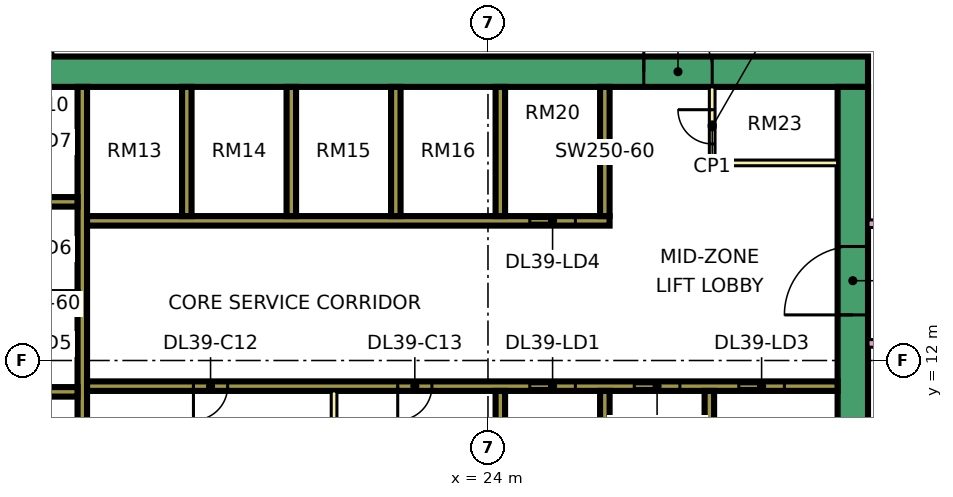
"""IFC4 building model, lengths in metres.
Left out: names, types, materials, properties, quantities, classifications, styles, units other than length and angle.
Written with IfcOpenShell. Run it as: python <this file> out.ifc"""

import sys

from ifc_helpers import new_model, si_unit, direction, frame, frame_2d, origin, place, context, subcontext, project, spatial, rectangle, extrude, element, fill, save


model = new_model("IFC4")
c1 = context("Model", 3, precision=1e-05, world=origin(), true_north=direction((0.0, 1.0)))
c2 = subcontext(c1, "Body", "Model", "MODEL_VIEW")
j1 = project(units=[si_unit("LENGTHUNIT", "METRE"), si_unit("PLANEANGLEUNIT", "RADIAN")], contexts=[c1])
p1 = place(None, origin())
s1 = spatial("IfcSite", under=j1, at=p1, CompositionType="ELEMENT")
p2 = place(p1, origin())
s2 = spatial("IfcBuilding", under=s1, at=p2, CompositionType="ELEMENT")
p3 = place(p2, frame((0.0, 0.0, 172.4)))
s3 = spatial("IfcBuildingStorey", under=s2, at=p3, CompositionType="ELEMENT", Elevation=172.4)
p4 = place(p3, frame((9.0, 19.6, 0.0), z_axis=(0.0, 0.0, 1.0), x_axis=(1.0, 0.0, 0.0)))
e1 = element("IfcWall", 1, at=p4, inside=s3, PredefinedType="SHEAR", context=c2, shape_type="SweptSolid", body=[
    extrude(rectangle(XDim=25.0, YDim=0.8, at=frame_2d((12.5, 0.0))), origin(), (0.0, 0.0, 1.0), 3.75),
])
p5 = place(p4, frame((19.1, 0.0, 0.0)))
e2 = element("IfcOpeningElement", 2, at=p5, cuts=e1, PredefinedType="OPENING", context=c2, shape_type="SweptSolid", body=[
    extrude(rectangle(XDim=1.8, YDim=2.4, at=frame_2d((0.9, 1.2))), frame((0.0, 0.41, 0.0), z_axis=(0.0, -1.0, 0.0), x_axis=(1.0, 0.0, 0.0)), (0.0, 0.0, 1.0), 0.82),
])
p6 = place(p3, frame((33.6, 7.8, 0.0), z_axis=(0.0, 0.0, 1.0), x_axis=(0.0, 1.0, 0.0)))
e3 = element("IfcWall", 3, at=p6, inside=s3, PredefinedType="SHEAR", context=c2, shape_type="SweptSolid", body=[
    extrude(rectangle(XDim=11.4, YDim=0.8, at=frame_2d((5.7, 0.0))), origin(), (0.0, 0.0, 1.0), 3.75),
])
p7 = place(p6, frame((5.4, 0.0, 0.0)))
e4 = element("IfcOpeningElement", 4, at=p7, cuts=e3, PredefinedType="OPENING", context=c2, shape_type="SweptSolid", body=[
    extrude(rectangle(XDim=1.8, YDim=2.4, at=frame_2d((0.9, 1.2))), frame((0.0, 0.41, 0.0), z_axis=(0.0, -1.0, 0.0), x_axis=(1.0, 0.0, 0.0)), (0.0, 0.0, 1.0), 0.82),
])
p8 = place(p3, frame((13.325, 7.8, 0.0), z_axis=(0.0, 0.0, 1.0), x_axis=(0.0, 1.0, 0.0)))
e5 = element("IfcWall", 5, at=p8, inside=s3, PredefinedType="SHEAR", context=c2, shape_type="SweptSolid", body=[
    extrude(rectangle(XDim=11.4, YDim=0.25, at=frame_2d((5.7, 0.0))), origin(), (0.0, 0.0, 1.0), 3.75),
])
p9 = place(p3, frame((13.45, 11.325, 0.0), z_axis=(0.0, 0.0, 1.0), x_axis=(1.0, 0.0, 0.0)))
e6 = element("IfcWall", 6, at=p9, inside=s3, PredefinedType="SHEAR", context=c2, shape_type="SweptSolid", body=[
    extrude(rectangle(XDim=19.75, YDim=0.25, at=frame_2d((9.875, 0.0))), origin(), (0.0, 0.0, 1.0), 3.75),
])
p10 = place(p9, frame((11.65, 0.0, 0.0)))
e7 = element("IfcOpeningElement", 7, at=p10, cuts=e6, PredefinedType="OPENING", context=c2, shape_type="SweptSolid", body=[
    extrude(rectangle(XDim=1.2, YDim=2.2, at=frame_2d((0.6, 1.1))), frame((0.0, 0.135, 0.0), z_axis=(0.0, -1.0, 0.0), x_axis=(1.0, 0.0, 0.0)), (0.0, 0.0, 1.0), 0.27),
])
p11 = place(p9, frame((14.4, 0.0, 0.0)))
e8 = element("IfcOpeningElement", 8, at=p11, cuts=e6, PredefinedType="OPENING", context=c2, shape_type="SweptSolid", body=[
    extrude(rectangle(XDim=1.2, YDim=2.2, at=frame_2d((0.6, 1.1))), frame((0.0, 0.135, 0.0), z_axis=(0.0, -1.0, 0.0), x_axis=(1.0, 0.0, 0.0)), (0.0, 0.0, 1.0), 0.27),
])
p12 = place(p9, frame((17.15, 0.0, 0.0)))
e9 = element("IfcOpeningElement", 9, at=p12, cuts=e6, PredefinedType="OPENING", context=c2, shape_type="SweptSolid", body=[
    extrude(rectangle(XDim=1.2, YDim=2.2, at=frame_2d((0.6, 1.1))), frame((0.0, 0.135, 0.0), z_axis=(0.0, -1.0, 0.0), x_axis=(1.0, 0.0, 0.0)), (0.0, 0.0, 1.0), 0.27),
])
p13 = place(p9, frame((2.8, 0.0, 0.0)))
e10 = element("IfcOpeningElement", 10, at=p13, cuts=e6, PredefinedType="OPENING", context=c2, shape_type="SweptSolid", body=[
    extrude(rectangle(XDim=0.9, YDim=2.1, at=frame_2d((0.45, 1.05))), frame((0.0, 0.135, 0.0), z_axis=(0.0, -1.0, 0.0), x_axis=(1.0, 0.0, 0.0)), (0.0, 0.0, 1.0), 0.27),
])
p14 = place(p9, frame((8.175, 0.0, 0.0)))
e11 = element("IfcOpeningElement", 11, at=p14, cuts=e6, PredefinedType="OPENING", context=c2, shape_type="SweptSolid", body=[
    extrude(rectangle(XDim=0.9, YDim=2.1, at=frame_2d((0.45, 1.05))), frame((0.0, 0.135, 0.0), z_axis=(0.0, -1.0, 0.0), x_axis=(1.0, 0.0, 0.0)), (0.0, 0.0, 1.0), 0.27),
])
p15 = place(p3, frame((13.45, 15.675, 0.0), z_axis=(0.0, 0.0, 1.0), x_axis=(1.0, 0.0, 0.0)))
e12 = element("IfcWall", 12, at=p15, inside=s3, PredefinedType="SHEAR", context=c2, shape_type="SweptSolid", body=[
    extrude(rectangle(XDim=13.75, YDim=0.25, at=frame_2d((6.875, 0.0))), origin(), (0.0, 0.0, 1.0), 3.75),
])
p16 = place(p15, frame((11.65, 0.0, 0.0)))
e13 = element("IfcOpeningElement", 13, at=p16, cuts=e12, PredefinedType="OPENING", context=c2, shape_type="SweptSolid", body=[
    extrude(rectangle(XDim=1.2, YDim=2.2, at=frame_2d((0.6, 1.1))), frame((0.0, 0.135, 0.0), z_axis=(0.0, -1.0, 0.0), x_axis=(1.0, 0.0, 0.0)), (0.0, 0.0, 1.0), 0.27),
])
for number, where, z_axis, x_axis in (
    (14, (10.2, 11.175, 0.0), (0.0, 0.0, 1.0), (1.0, 0.0, 0.0)),
    (15, (10.2, 13.675, 0.0), (0.0, 0.0, 1.0), (1.0, 0.0, 0.0)),
    (16, (10.2, 16.175, 0.0), (0.0, 0.0, 1.0), (1.0, 0.0, 0.0)),
):
    element("IfcWall", number, at=place(p3, frame(where, z_axis=z_axis, x_axis=x_axis)), inside=s3, PredefinedType="SHEAR", context=c2, shape_type="SweptSolid", body=[
        extrude(rectangle(XDim=3.0, YDim=0.25, at=frame_2d((1.5, 0.0))), origin(), (0.0, 0.0, 1.0), 3.75),
    ])
for number, where, z_axis, x_axis in (
    (17, (24.325, 7.8, 0.0), (0.0, 0.0, 1.0), (0.0, 1.0, 0.0)),
    (18, (27.075, 7.8, 0.0), (0.0, 0.0, 1.0), (0.0, 1.0, 0.0)),
    (19, (29.825, 7.8, 0.0), (0.0, 0.0, 1.0), (0.0, 1.0, 0.0)),
    (20, (16.075, 15.8, 0.0), (0.0, 0.0, 1.0), (0.0, 1.0, 0.0)),
    (21, (18.825, 15.8, 0.0), (0.0, 0.0, 1.0), (0.0, 1.0, 0.0)),
    (22, (21.575, 15.8, 0.0), (0.0, 0.0, 1.0), (0.0, 1.0, 0.0)),
    (23, (24.325, 15.8, 0.0), (0.0, 0.0, 1.0), (0.0, 1.0, 0.0)),
    (24, (27.075, 15.8, 0.0), (0.0, 0.0, 1.0), (0.0, 1.0, 0.0)),
):
    element("IfcWall", number, at=place(p3, frame(where, z_axis=z_axis, x_axis=x_axis)), inside=s3, PredefinedType="SHEAR", context=c2, shape_type="SweptSolid", body=[
        extrude(rectangle(XDim=3.4, YDim=0.25, at=frame_2d((1.7, 0.0))), origin(), (0.0, 0.0, 1.0), 3.75),
    ])
p17 = place(p3, frame((-1.447, 12.553, 0.0), z_axis=(0.0, 0.0, 1.0), x_axis=(0.707106781187, -0.707106781187, 0.0)))
e25 = element("IfcWall", 25, at=p17, inside=s3, PredefinedType="SOLIDWALL", context=c2, shape_type="SweptSolid", body=[
    extrude(rectangle(XDim=19.799, YDim=0.15, at=frame_2d((9.899, 0.0))), origin(), (0.0, 0.0, 1.0), 3.35),
])
p18 = place(p17, frame((2.212, 0.0, 0.45)))
e26 = element("IfcOpeningElement", 26, at=p18, cuts=e25, PredefinedType="OPENING", context=c2, shape_type="SweptSolid", body=[
    extrude(rectangle(XDim=3.0, YDim=2.4, at=frame_2d((1.5, 1.2))), frame((0.0, 0.085, 0.0), z_axis=(0.0, -1.0, 0.0), x_axis=(1.0, 0.0, 0.0)), (0.0, 0.0, 1.0), 0.17),
])
p19 = place(p17, frame((10.216, 0.0, 0.45)))
e27 = element("IfcOpeningElement", 27, at=p19, cuts=e25, PredefinedType="OPENING", context=c2, shape_type="SweptSolid", body=[
    extrude(rectangle(XDim=3.0, YDim=2.4, at=frame_2d((1.5, 1.2))), frame((0.0, 0.085, 0.0), z_axis=(0.0, -1.0, 0.0), x_axis=(1.0, 0.0, 0.0)), (0.0, 0.0, 1.0), 0.17),
])
p20 = place(p3, frame((19.95, 7.8, 0.0), z_axis=(0.0, 0.0, 1.0), x_axis=(0.0, 1.0, 0.0)))
e28 = element("IfcWall", 28, at=p20, inside=s3, PredefinedType="PARTITIONING", context=c2, shape_type="SweptSolid", body=[
    extrude(rectangle(XDim=3.4, YDim=0.15, at=frame_2d((1.7, 0.0))), origin(), (0.0, 0.0, 1.0), 3.35),
])
p21 = place(p3, frame((29.9, 17.2, 0.0), z_axis=(0.0, 0.0, 1.0), x_axis=(0.0, 1.0, 0.0)))
e29 = element("IfcWall", 29, at=p21, inside=s3, PredefinedType="PARTITIONING", context=c2, shape_type="SweptSolid", body=[
    extrude(rectangle(XDim=2.0, YDim=0.15, at=frame_2d((1.0, 0.0))), origin(), (0.0, 0.0, 1.0), 3.35),
])
p22 = place(p21, frame((0.5, 0.0, 0.0)))
e30 = element("IfcOpeningElement", 30, at=p22, cuts=e29, PredefinedType="OPENING", context=c2, shape_type="SweptSolid", body=[
    extrude(rectangle(XDim=0.9, YDim=2.1, at=frame_2d((0.45, 1.05))), frame((0.0, 0.085, 0.0), z_axis=(0.0, -1.0, 0.0), x_axis=(1.0, 0.0, 0.0)), (0.0, 0.0, 1.0), 0.17),
])
p23 = place(p3, frame((29.9, 17.2, 0.0), z_axis=(0.0, 0.0, 1.0), x_axis=(1.0, 0.0, 0.0)))
e31 = element("IfcWall", 31, at=p23, inside=s3, PredefinedType="PARTITIONING", context=c2, shape_type="SweptSolid", body=[
    extrude(rectangle(XDim=3.3, YDim=0.15, at=frame_2d((1.65, 0.0))), origin(), (0.0, 0.0, 1.0), 3.35),
])
p24 = place(p3, frame((12.45, 20.0, 0.0), z_axis=(0.0, 0.0, 1.0), x_axis=(0.0, 1.0, 0.0)))
e32 = element("IfcWall", 32, at=p24, inside=s3, PredefinedType="PARTITIONING", context=c2, shape_type="SweptSolid", body=[
    extrude(rectangle(XDim=43.0, YDim=0.2, at=frame_2d((21.5, 0.0))), origin(), (0.0, 0.0, 1.0), 3.35),
])
p25 = place(p24, frame((5.95, 0.0, 0.0)))
e33 = element("IfcOpeningElement", 33, at=p25, cuts=e32, PredefinedType="OPENING", context=c2, shape_type="SweptSolid", body=[
    extrude(rectangle(XDim=1.0, YDim=2.1, at=frame_2d((0.5, 1.05))), frame((0.0, 0.11, 0.0), z_axis=(0.0, -1.0, 0.0), x_axis=(1.0, 0.0, 0.0)), (0.0, 0.0, 1.0), 0.22),
])
p26 = place(p24, frame((12.0, 0.0, 0.0)))
e34 = element("IfcOpeningElement", 34, at=p26, cuts=e32, PredefinedType="OPENING", context=c2, shape_type="SweptSolid", body=[
    extrude(rectangle(XDim=1.0, YDim=2.1, at=frame_2d((0.5, 1.05))), frame((0.0, 0.11, 0.0), z_axis=(0.0, -1.0, 0.0), x_axis=(1.0, 0.0, 0.0)), (0.0, 0.0, 1.0), 0.22),
])
p27 = place(p24, frame((22.75, 0.0, 0.0)))
e35 = element("IfcOpeningElement", 35, at=p27, cuts=e32, PredefinedType="OPENING", context=c2, shape_type="SweptSolid", body=[
    extrude(rectangle(XDim=1.0, YDim=2.1, at=frame_2d((0.5, 1.05))), frame((0.0, 0.11, 0.0), z_axis=(0.0, -1.0, 0.0), x_axis=(1.0, 0.0, 0.0)), (0.0, 0.0, 1.0), 0.22),
])
p28 = place(p24, frame((34.75, 0.0, 0.0)))
e36 = element("IfcOpeningElement", 36, at=p28, cuts=e32, PredefinedType="OPENING", context=c2, shape_type="SweptSolid", body=[
    extrude(rectangle(XDim=1.0, YDim=2.1, at=frame_2d((0.5, 1.05))), frame((0.0, 0.11, 0.0), z_axis=(0.0, -1.0, 0.0), x_axis=(1.0, 0.0, 0.0)), (0.0, 0.0, 1.0), 0.22),
])
p29 = place(p24, frame((1.15, 0.0, 0.0)))
e37 = element("IfcOpeningElement", 37, at=p29, cuts=e32, PredefinedType="OPENING", context=c2, shape_type="SweptSolid", body=[
    extrude(rectangle(XDim=1.8, YDim=2.1, at=frame_2d((0.9, 1.05))), frame((0.0, 0.11, 0.0), z_axis=(0.0, -1.0, 0.0), x_axis=(1.0, 0.0, 0.0)), (0.0, 0.0, 1.0), 0.22),
])
p30 = place(p24, frame((28.6, 0.0, 0.0)))
e38 = element("IfcOpeningElement", 38, at=p30, cuts=e32, PredefinedType="OPENING", context=c2, shape_type="SweptSolid", body=[
    extrude(rectangle(XDim=1.8, YDim=2.1, at=frame_2d((0.9, 1.05))), frame((0.0, 0.11, 0.0), z_axis=(0.0, -1.0, 0.0), x_axis=(1.0, 0.0, 0.0)), (0.0, 0.0, 1.0), 0.22),
])
p31 = place(p3, frame((34.0, 12.45, 0.0), z_axis=(0.0, 0.0, 1.0), x_axis=(1.0, 0.0, 0.0)))
e39 = element("IfcWall", 39, at=p31, inside=s3, PredefinedType="PARTITIONING", context=c2, shape_type="SweptSolid", body=[
    extrude(rectangle(XDim=2.451, YDim=0.2, at=frame_2d((1.226, 0.0))), origin(), (0.0, 0.0, 1.0), 3.35),
])
p32 = place(p3, frame((34.0, 15.6, 0.0), z_axis=(0.0, 0.0, 1.0), x_axis=(1.0, 0.0, 0.0)))
e40 = element("IfcWall", 40, at=p32, inside=s3, PredefinedType="PARTITIONING", context=c2, shape_type="SweptSolid", body=[
    extrude(rectangle(XDim=10.35, YDim=0.2, at=frame_2d((5.175, 0.0))), origin(), (0.0, 0.0, 1.0), 3.35),
])
p33 = place(p32, frame((5.6, 0.0, 0.0)))
e41 = element("IfcOpeningElement", 41, at=p33, cuts=e40, PredefinedType="OPENING", context=c2, shape_type="SweptSolid", body=[
    extrude(rectangle(XDim=1.0, YDim=2.1, at=frame_2d((0.5, 1.05))), frame((0.0, 0.11, 0.0), z_axis=(0.0, -1.0, 0.0), x_axis=(1.0, 0.0, 0.0)), (0.0, 0.0, 1.0), 0.22),
])
p34 = place(p32, frame((0.45, 0.0, 0.0)))
e42 = element("IfcOpeningElement", 42, at=p34, cuts=e40, PredefinedType="OPENING", context=c2, shape_type="SweptSolid", body=[
    extrude(rectangle(XDim=1.2, YDim=2.1, at=frame_2d((0.6, 1.05))), frame((0.0, 0.11, 0.0), z_axis=(0.0, -1.0, 0.0), x_axis=(1.0, 0.0, 0.0)), (0.0, 0.0, 1.0), 0.22),
])
p35 = place(p10, origin())
e43 = element("IfcDoor", 43, at=p35, inside=s3, OperationType="DOUBLE_DOOR_SLIDING", PredefinedType="DOOR", context=c2, shape_type="SweptSolid", body=[
    extrude(rectangle(XDim=1.2, YDim=2.2, at=frame_2d((0.6, 1.1))), frame((0.0, 0.025, 0.0), z_axis=(0.0, -1.0, 0.0), x_axis=(1.0, 0.0, 0.0)), (0.0, 0.0, 1.0), 0.05),
])
fill(e7, e43)
p36 = place(p11, origin())
e44 = element("IfcDoor", 44, at=p36, inside=s3, OperationType="DOUBLE_DOOR_SLIDING", PredefinedType="DOOR", context=c2, shape_type="SweptSolid", body=[
    extrude(rectangle(XDim=1.2, YDim=2.2, at=frame_2d((0.6, 1.1))), frame((0.0, 0.025, 0.0), z_axis=(0.0, -1.0, 0.0), x_axis=(1.0, 0.0, 0.0)), (0.0, 0.0, 1.0), 0.05),
])
fill(e8, e44)
p37 = place(p12, origin())
e45 = element("IfcDoor", 45, at=p37, inside=s3, OperationType="DOUBLE_DOOR_SLIDING", PredefinedType="DOOR", context=c2, shape_type="SweptSolid", body=[
    extrude(rectangle(XDim=1.2, YDim=2.2, at=frame_2d((0.6, 1.1))), frame((0.0, 0.025, 0.0), z_axis=(0.0, -1.0, 0.0), x_axis=(1.0, 0.0, 0.0)), (0.0, 0.0, 1.0), 0.05),
])
fill(e9, e45)
p38 = place(p16, origin())
e46 = element("IfcDoor", 46, at=p38, inside=s3, OperationType="DOUBLE_DOOR_SLIDING", PredefinedType="DOOR", context=c2, shape_type="SweptSolid", body=[
    extrude(rectangle(XDim=1.2, YDim=2.2, at=frame_2d((0.6, 1.1))), frame((0.0, 0.025, 0.0), z_axis=(0.0, -1.0, 0.0), x_axis=(1.0, 0.0, 0.0)), (0.0, 0.0, 1.0), 0.05),
])
fill(e13, e46)
p39 = place(p7, origin())
e47 = element("IfcDoor", 47, at=p39, inside=s3, OperationType="DOUBLE_DOOR_SINGLE_SWING", PredefinedType="DOOR", context=c2, shape_type="SweptSolid", body=[
    extrude(rectangle(XDim=1.8, YDim=2.4, at=frame_2d((0.9, 1.2))), frame((0.0, 0.025, 0.0), z_axis=(0.0, -1.0, 0.0), x_axis=(1.0, 0.0, 0.0)), (0.0, 0.0, 1.0), 0.05),
])
fill(e4, e47)
p40 = place(p5, origin())
e48 = element("IfcDoor", 48, at=p40, inside=s3, OperationType="DOUBLE_DOOR_SINGLE_SWING", PredefinedType="DOOR", context=c2, shape_type="SweptSolid", body=[
    extrude(rectangle(XDim=1.8, YDim=2.4, at=frame_2d((0.9, 1.2))), frame((0.0, 0.025, 0.0), z_axis=(0.0, -1.0, 0.0), x_axis=(1.0, 0.0, 0.0)), (0.0, 0.0, 1.0), 0.05),
])
fill(e2, e48)
p41 = place(p13, frame((0.9, 0.0, 0.0), z_axis=(0.0, 0.0, 1.0), x_axis=(-1.0, 0.0, 0.0)))
e49 = element("IfcDoor", 49, at=p41, inside=s3, OperationType="SINGLE_SWING_LEFT", PredefinedType="DOOR", context=c2, shape_type="SweptSolid", body=[
    extrude(rectangle(XDim=0.9, YDim=2.1, at=frame_2d((0.45, 1.05))), frame((0.0, 0.025, 0.0), z_axis=(0.0, -1.0, 0.0), x_axis=(1.0, 0.0, 0.0)), (0.0, 0.0, 1.0), 0.05),
])
fill(e10, e49)
p42 = place(p14, frame((0.9, 0.0, 0.0), z_axis=(0.0, 0.0, 1.0), x_axis=(-1.0, 0.0, 0.0)))
e50 = element("IfcDoor", 50, at=p42, inside=s3, OperationType="SINGLE_SWING_LEFT", PredefinedType="DOOR", context=c2, shape_type="SweptSolid", body=[
    extrude(rectangle(XDim=0.9, YDim=2.1, at=frame_2d((0.45, 1.05))), frame((0.0, 0.025, 0.0), z_axis=(0.0, -1.0, 0.0), x_axis=(1.0, 0.0, 0.0)), (0.0, 0.0, 1.0), 0.05),
])
fill(e11, e50)
p43 = place(p22, frame((0.9, 0.0, 0.0), z_axis=(0.0, 0.0, 1.0), x_axis=(-1.0, 0.0, 0.0)))
e51 = element("IfcDoor", 51, at=p43, inside=s3, OperationType="SINGLE_SWING_RIGHT", PredefinedType="DOOR", context=c2, shape_type="SweptSolid", body=[
    extrude(rectangle(XDim=0.9, YDim=2.1, at=frame_2d((0.45, 1.05))), frame((0.0, 0.025, 0.0), z_axis=(0.0, -1.0, 0.0), x_axis=(1.0, 0.0, 0.0)), (0.0, 0.0, 1.0), 0.05),
])
fill(e30, e51)
save(model, sys.argv[1])
